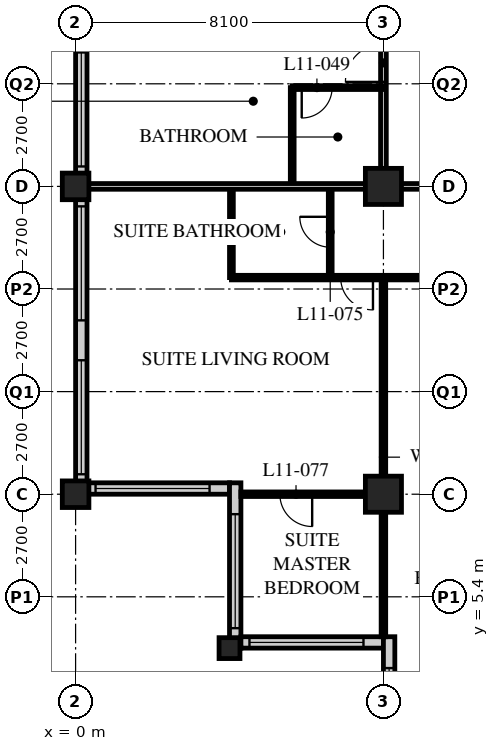
"""IFC4 building model, lengths in metres.
Left out: names, types, materials, properties, quantities, classifications, styles, units other than length and angle.
Written with IfcOpenShell. Run it as: python <this file> out.ifc"""

import sys

from ifc_helpers import new_model, si_unit, direction, frame, frame_2d, origin, origin_2d, place, context, subcontext, project, spatial, rectangle, hollow_rectangle, extrude, element, fill, save


model = new_model("IFC4")
c1 = context("Model", 3, precision=1e-05, world=origin(), true_north=direction((0.0, 1.0)))
c2 = subcontext(c1, "Body", "Model", "MODEL_VIEW")
j1 = project(units=[si_unit("LENGTHUNIT", "METRE"), si_unit("PLANEANGLEUNIT", "RADIAN")], contexts=[c1])
p1 = place(None, origin())
s1 = spatial("IfcSite", under=j1, at=p1, CompositionType="ELEMENT")
p2 = place(p1, origin())
s2 = spatial("IfcBuilding", under=s1, at=p2, CompositionType="ELEMENT")
p3 = place(p2, frame((0.0, 0.0, 50.0)))
s3 = spatial("IfcBuildingStorey", under=s2, at=p3, CompositionType="ELEMENT", Elevation=50.0)
for number, where, z_axis, x_axis in (
    (1, (0.0, 8.1, 0.0), (0.0, 0.0, 1.0), (1.0, 0.0, 0.0)),
    (2, (0.0, 16.2, 0.0), (0.0, 0.0, 1.0), (1.0, 0.0, 0.0)),
):
    element("IfcColumn", number, at=place(p3, frame(where, z_axis=z_axis, x_axis=x_axis)), inside=s3, PredefinedType="COLUMN", context=c2, shape_type="SweptSolid", body=[
        extrude(hollow_rectangle(XDim=0.7, YDim=0.7, WallThickness=0.06, at=origin_2d()), origin(), (0.0, 0.0, 1.0), 3.4),
    ])
p4 = place(p3, frame((4.05, 4.05, 0.0), z_axis=(0.0, 0.0, 1.0), x_axis=(1.0, 0.0, 0.0)))
e3 = element("IfcColumn", 3, at=p4, inside=s3, PredefinedType="COLUMN", context=c2, shape_type="SweptSolid", body=[
    extrude(hollow_rectangle(XDim=0.55, YDim=0.55, WallThickness=0.05, at=origin_2d()), origin(), (0.0, 0.0, 1.0), 3.4),
])
for number, where, z_axis, x_axis in (
    (4, (8.1, 8.1, 0.0), (0.0, 0.0, 1.0), (1.0, 0.0, 0.0)),
    (5, (8.1, 16.2, 0.0), (0.0, 0.0, 1.0), (1.0, 0.0, 0.0)),
):
    element("IfcColumn", number, at=place(p3, frame(where, z_axis=z_axis, x_axis=x_axis)), inside=s3, PredefinedType="COLUMN", context=c2, shape_type="SweptSolid", body=[
        extrude(hollow_rectangle(XDim=0.95, YDim=0.95, WallThickness=0.095, at=origin_2d()), origin(), (0.0, 0.0, 1.0), 3.4),
    ])
p5 = place(p3, frame((0.15, 40.2, 0.0), z_axis=(0.0, 0.0, 1.0), x_axis=(0.0, -1.0, 0.0)))
e6 = element("IfcWall", 6, at=p5, inside=s3, PredefinedType="SOLIDWALL", context=c2, shape_type="SweptSolid", body=[
    extrude(rectangle(XDim=32.1, YDim=0.3, at=frame_2d((16.05, 0.0))), origin(), (0.0, 0.0, 1.0), 3.19),
])
p6 = place(p5, frame((0.225, 0.0, 0.9)))
e7 = element("IfcOpeningElement", 7, at=p6, cuts=e6, PredefinedType="OPENING", context=c2, shape_type="SweptSolid", body=[
    extrude(rectangle(XDim=3.0, YDim=2.0, at=frame_2d((1.5, 1.0))), frame((0.0, 0.16, 0.0), z_axis=(0.0, -1.0, 0.0), x_axis=(1.0, 0.0, 0.0)), (0.0, 0.0, 1.0), 0.32),
])
p7 = place(p5, frame((4.275, 0.0, 0.9)))
e8 = element("IfcOpeningElement", 8, at=p7, cuts=e6, PredefinedType="OPENING", context=c2, shape_type="SweptSolid", body=[
    extrude(rectangle(XDim=3.0, YDim=2.0, at=frame_2d((1.5, 1.0))), frame((0.0, 0.16, 0.0), z_axis=(0.0, -1.0, 0.0), x_axis=(1.0, 0.0, 0.0)), (0.0, 0.0, 1.0), 0.32),
])
p8 = place(p5, frame((8.325, 0.0, 0.9)))
e9 = element("IfcOpeningElement", 9, at=p8, cuts=e6, PredefinedType="OPENING", context=c2, shape_type="SweptSolid", body=[
    extrude(rectangle(XDim=3.0, YDim=2.0, at=frame_2d((1.5, 1.0))), frame((0.0, 0.16, 0.0), z_axis=(0.0, -1.0, 0.0), x_axis=(1.0, 0.0, 0.0)), (0.0, 0.0, 1.0), 0.32),
])
p9 = place(p5, frame((12.375, 0.0, 0.9)))
e10 = element("IfcOpeningElement", 10, at=p9, cuts=e6, PredefinedType="OPENING", context=c2, shape_type="SweptSolid", body=[
    extrude(rectangle(XDim=3.0, YDim=2.0, at=frame_2d((1.5, 1.0))), frame((0.0, 0.16, 0.0), z_axis=(0.0, -1.0, 0.0), x_axis=(1.0, 0.0, 0.0)), (0.0, 0.0, 1.0), 0.32),
])
p10 = place(p5, frame((16.425, 0.0, 0.9)))
e11 = element("IfcOpeningElement", 11, at=p10, cuts=e6, PredefinedType="OPENING", context=c2, shape_type="SweptSolid", body=[
    extrude(rectangle(XDim=3.0, YDim=2.0, at=frame_2d((1.5, 1.0))), frame((0.0, 0.16, 0.0), z_axis=(0.0, -1.0, 0.0), x_axis=(1.0, 0.0, 0.0)), (0.0, 0.0, 1.0), 0.32),
])
p11 = place(p5, frame((20.475, 0.0, 0.9)))
e12 = element("IfcOpeningElement", 12, at=p11, cuts=e6, PredefinedType="OPENING", context=c2, shape_type="SweptSolid", body=[
    extrude(rectangle(XDim=3.0, YDim=2.0, at=frame_2d((1.5, 1.0))), frame((0.0, 0.16, 0.0), z_axis=(0.0, -1.0, 0.0), x_axis=(1.0, 0.0, 0.0)), (0.0, 0.0, 1.0), 0.32),
])
p12 = place(p5, frame((24.525, 0.0, 0.9)))
e13 = element("IfcOpeningElement", 13, at=p12, cuts=e6, PredefinedType="OPENING", context=c2, shape_type="SweptSolid", body=[
    extrude(rectangle(XDim=3.0, YDim=2.0, at=frame_2d((1.5, 1.0))), frame((0.0, 0.16, 0.0), z_axis=(0.0, -1.0, 0.0), x_axis=(1.0, 0.0, 0.0)), (0.0, 0.0, 1.0), 0.32),
])
p13 = place(p5, frame((28.575, 0.0, 0.9)))
e14 = element("IfcOpeningElement", 14, at=p13, cuts=e6, PredefinedType="OPENING", context=c2, shape_type="SweptSolid", body=[
    extrude(rectangle(XDim=3.0, YDim=2.0, at=frame_2d((1.5, 1.0))), frame((0.0, 0.16, 0.0), z_axis=(0.0, -1.0, 0.0), x_axis=(1.0, 0.0, 0.0)), (0.0, 0.0, 1.0), 0.32),
])
p14 = place(p3, frame((0.3, 8.25, 0.0), z_axis=(0.0, 0.0, 1.0), x_axis=(1.0, 0.0, 0.0)))
e15 = element("IfcWall", 15, at=p14, inside=s3, PredefinedType="SOLIDWALL", context=c2, shape_type="SweptSolid", body=[
    extrude(rectangle(XDim=3.75, YDim=0.3, at=frame_2d((1.875, 0.0))), origin(), (0.0, 0.0, 1.0), 3.19),
])
p15 = place(p14, frame((0.225, 0.0, 0.9)))
e16 = element("IfcOpeningElement", 16, at=p15, cuts=e15, PredefinedType="OPENING", context=c2, shape_type="SweptSolid", body=[
    extrude(rectangle(XDim=3.0, YDim=1.5, at=frame_2d((1.5, 0.75))), frame((0.0, 0.16, 0.0), z_axis=(0.0, -1.0, 0.0), x_axis=(1.0, 0.0, 0.0)), (0.0, 0.0, 1.0), 0.32),
])
p16 = place(p3, frame((4.2, 8.4, 0.0), z_axis=(0.0, 0.0, 1.0), x_axis=(0.0, -1.0, 0.0)))
e17 = element("IfcWall", 17, at=p16, inside=s3, PredefinedType="SOLIDWALL", context=c2, shape_type="SweptSolid", body=[
    extrude(rectangle(XDim=4.35, YDim=0.3, at=frame_2d((2.175, 0.0))), origin(), (0.0, 0.0, 1.0), 3.19),
])
p17 = place(p16, frame((0.825, 0.0, 0.9)))
e18 = element("IfcOpeningElement", 18, at=p17, cuts=e17, PredefinedType="OPENING", context=c2, shape_type="SweptSolid", body=[
    extrude(rectangle(XDim=3.0, YDim=1.5, at=frame_2d((1.5, 0.75))), frame((0.0, 0.16, 0.0), z_axis=(0.0, -1.0, 0.0), x_axis=(1.0, 0.0, 0.0)), (0.0, 0.0, 1.0), 0.32),
])
p18 = place(p3, frame((4.35, 4.2, 0.0), z_axis=(0.0, 0.0, 1.0), x_axis=(1.0, 0.0, 0.0)))
e19 = element("IfcWall", 19, at=p18, inside=s3, PredefinedType="SOLIDWALL", context=c2, shape_type="SweptSolid", body=[
    extrude(rectangle(XDim=3.75, YDim=0.3, at=frame_2d((1.875, 0.0))), origin(), (0.0, 0.0, 1.0), 3.19),
])
p19 = place(p18, frame((0.225, 0.0, 0.9)))
e20 = element("IfcOpeningElement", 20, at=p19, cuts=e19, PredefinedType="OPENING", context=c2, shape_type="SweptSolid", body=[
    extrude(rectangle(XDim=3.0, YDim=1.5, at=frame_2d((1.5, 0.75))), frame((0.0, 0.16, 0.0), z_axis=(0.0, -1.0, 0.0), x_axis=(1.0, 0.0, 0.0)), (0.0, 0.0, 1.0), 0.32),
])
p20 = place(p3, frame((8.25, 4.35, 0.0), z_axis=(0.0, 0.0, 1.0), x_axis=(0.0, -1.0, 0.0)))
e21 = element("IfcWall", 21, at=p20, inside=s3, PredefinedType="SOLIDWALL", context=c2, shape_type="SweptSolid", body=[
    extrude(rectangle(XDim=4.35, YDim=0.3, at=frame_2d((2.175, 0.0))), origin(), (0.0, 0.0, 1.0), 3.19),
])
p21 = place(p20, frame((0.825, 0.0, 0.9)))
e22 = element("IfcOpeningElement", 22, at=p21, cuts=e21, PredefinedType="OPENING", context=c2, shape_type="SweptSolid", body=[
    extrude(rectangle(XDim=3.0, YDim=1.5, at=frame_2d((1.5, 0.75))), frame((0.0, 0.16, 0.0), z_axis=(0.0, -1.0, 0.0), x_axis=(1.0, 0.0, 0.0)), (0.0, 0.0, 1.0), 0.32),
])
p22 = place(p3, frame((8.1, 16.2, 0.0), z_axis=(0.0, 0.0, 1.0), x_axis=(1.0, 0.0, 0.0)))
e23 = element("IfcWall", 23, at=p22, inside=s3, PredefinedType="PARTITIONING", context=c2, shape_type="SweptSolid", body=[
    extrude(rectangle(XDim=40.5, YDim=0.15, at=frame_2d((20.25, 0.0))), origin(), (0.0, 0.0, 1.0), 2.578),
])
p23 = place(p22, frame((4.35, 0.0, 0.0)))
e24 = element("IfcOpeningElement", 24, at=p23, cuts=e23, PredefinedType="OPENING", context=c2, shape_type="SweptSolid", body=[
    extrude(rectangle(XDim=1.0, YDim=2.1, at=frame_2d((0.5, 1.05))), frame((0.0, 0.085, 0.0), z_axis=(0.0, -1.0, 0.0), x_axis=(1.0, 0.0, 0.0)), (0.0, 0.0, 1.0), 0.17),
])
p24 = place(p22, frame((10.85, 0.0, 0.0)))
e25 = element("IfcOpeningElement", 25, at=p24, cuts=e23, PredefinedType="OPENING", context=c2, shape_type="SweptSolid", body=[
    extrude(rectangle(XDim=1.0, YDim=2.1, at=frame_2d((0.5, 1.05))), frame((0.0, 0.085, 0.0), z_axis=(0.0, -1.0, 0.0), x_axis=(1.0, 0.0, 0.0)), (0.0, 0.0, 1.0), 0.17),
])
p25 = place(p22, frame((12.75, 0.0, 0.0)))
e26 = element("IfcOpeningElement", 26, at=p25, cuts=e23, PredefinedType="OPENING", context=c2, shape_type="SweptSolid", body=[
    extrude(rectangle(XDim=1.0, YDim=2.1, at=frame_2d((0.5, 1.05))), frame((0.0, 0.085, 0.0), z_axis=(0.0, -1.0, 0.0), x_axis=(1.0, 0.0, 0.0)), (0.0, 0.0, 1.0), 0.17),
])
p26 = place(p22, frame((18.95, 0.0, 0.0)))
e27 = element("IfcOpeningElement", 27, at=p26, cuts=e23, PredefinedType="OPENING", context=c2, shape_type="SweptSolid", body=[
    extrude(rectangle(XDim=1.0, YDim=2.1, at=frame_2d((0.5, 1.05))), frame((0.0, 0.085, 0.0), z_axis=(0.0, -1.0, 0.0), x_axis=(1.0, 0.0, 0.0)), (0.0, 0.0, 1.0), 0.17),
])
p27 = place(p22, frame((20.55, 0.0, 0.0)))
e28 = element("IfcOpeningElement", 28, at=p27, cuts=e23, PredefinedType="OPENING", context=c2, shape_type="SweptSolid", body=[
    extrude(rectangle(XDim=1.0, YDim=2.1, at=frame_2d((0.5, 1.05))), frame((0.0, 0.085, 0.0), z_axis=(0.0, -1.0, 0.0), x_axis=(1.0, 0.0, 0.0)), (0.0, 0.0, 1.0), 0.17),
])
p28 = place(p22, frame((27.05, 0.0, 0.0)))
e29 = element("IfcOpeningElement", 29, at=p28, cuts=e23, PredefinedType="OPENING", context=c2, shape_type="SweptSolid", body=[
    extrude(rectangle(XDim=1.0, YDim=2.1, at=frame_2d((0.5, 1.05))), frame((0.0, 0.085, 0.0), z_axis=(0.0, -1.0, 0.0), x_axis=(1.0, 0.0, 0.0)), (0.0, 0.0, 1.0), 0.17),
])
p29 = place(p22, frame((28.95, 0.0, 0.0)))
e30 = element("IfcOpeningElement", 30, at=p29, cuts=e23, PredefinedType="OPENING", context=c2, shape_type="SweptSolid", body=[
    extrude(rectangle(XDim=1.0, YDim=2.1, at=frame_2d((0.5, 1.05))), frame((0.0, 0.085, 0.0), z_axis=(0.0, -1.0, 0.0), x_axis=(1.0, 0.0, 0.0)), (0.0, 0.0, 1.0), 0.17),
])
p30 = place(p22, frame((34.85, 0.0, 0.0)))
e31 = element("IfcOpeningElement", 31, at=p30, cuts=e23, PredefinedType="OPENING", context=c2, shape_type="SweptSolid", body=[
    extrude(rectangle(XDim=1.0, YDim=2.1, at=frame_2d((0.5, 1.05))), frame((0.0, 0.085, 0.0), z_axis=(0.0, -1.0, 0.0), x_axis=(1.0, 0.0, 0.0)), (0.0, 0.0, 1.0), 0.17),
])
p31 = place(p22, frame((1.525, 0.0, 0.0)))
e32 = element("IfcOpeningElement", 32, at=p31, cuts=e23, PredefinedType="OPENING", context=c2, shape_type="SweptSolid", body=[
    extrude(rectangle(XDim=1.0, YDim=2.1, at=frame_2d((0.5, 1.05))), frame((0.0, 0.085, 0.0), z_axis=(0.0, -1.0, 0.0), x_axis=(1.0, 0.0, 0.0)), (0.0, 0.0, 1.0), 0.17),
])
p32 = place(p22, frame((37.975, 0.0, 0.0)))
e33 = element("IfcOpeningElement", 33, at=p32, cuts=e23, PredefinedType="OPENING", context=c2, shape_type="SweptSolid", body=[
    extrude(rectangle(XDim=1.0, YDim=2.1, at=frame_2d((0.5, 1.05))), frame((0.0, 0.085, 0.0), z_axis=(0.0, -1.0, 0.0), x_axis=(1.0, 0.0, 0.0)), (0.0, 0.0, 1.0), 0.17),
])
p33 = place(p3, frame((8.1, 16.2, 0.0), z_axis=(0.0, 0.0, 1.0), x_axis=(0.0, 1.0, 0.0)))
e34 = element("IfcWall", 34, at=p33, inside=s3, PredefinedType="PARTITIONING", context=c2, shape_type="SweptSolid", body=[
    extrude(rectangle(XDim=26.1, YDim=0.15, at=frame_2d((13.05, 0.0))), origin(), (0.0, 0.0, 1.0), 2.578),
])
p34 = place(p33, frame((2.75, 0.0, 0.0)))
e35 = element("IfcOpeningElement", 35, at=p34, cuts=e34, PredefinedType="OPENING", context=c2, shape_type="SweptSolid", body=[
    extrude(rectangle(XDim=1.0, YDim=2.1, at=frame_2d((0.5, 1.05))), frame((0.0, 0.085, 0.0), z_axis=(0.0, -1.0, 0.0), x_axis=(1.0, 0.0, 0.0)), (0.0, 0.0, 1.0), 0.17),
])
p35 = place(p33, frame((4.35, 0.0, 0.0)))
e36 = element("IfcOpeningElement", 36, at=p35, cuts=e34, PredefinedType="OPENING", context=c2, shape_type="SweptSolid", body=[
    extrude(rectangle(XDim=1.0, YDim=2.1, at=frame_2d((0.5, 1.05))), frame((0.0, 0.085, 0.0), z_axis=(0.0, -1.0, 0.0), x_axis=(1.0, 0.0, 0.0)), (0.0, 0.0, 1.0), 0.17),
])
p36 = place(p33, frame((10.85, 0.0, 0.0)))
e37 = element("IfcOpeningElement", 37, at=p36, cuts=e34, PredefinedType="OPENING", context=c2, shape_type="SweptSolid", body=[
    extrude(rectangle(XDim=1.0, YDim=2.1, at=frame_2d((0.5, 1.05))), frame((0.0, 0.085, 0.0), z_axis=(0.0, -1.0, 0.0), x_axis=(1.0, 0.0, 0.0)), (0.0, 0.0, 1.0), 0.17),
])
p37 = place(p33, frame((12.45, 0.0, 0.0)))
e38 = element("IfcOpeningElement", 38, at=p37, cuts=e34, PredefinedType="OPENING", context=c2, shape_type="SweptSolid", body=[
    extrude(rectangle(XDim=1.0, YDim=2.1, at=frame_2d((0.5, 1.05))), frame((0.0, 0.085, 0.0), z_axis=(0.0, -1.0, 0.0), x_axis=(1.0, 0.0, 0.0)), (0.0, 0.0, 1.0), 0.17),
])
p38 = place(p33, frame((18.65, 0.0, 0.0)))
e39 = element("IfcOpeningElement", 39, at=p38, cuts=e34, PredefinedType="OPENING", context=c2, shape_type="SweptSolid", body=[
    extrude(rectangle(XDim=1.0, YDim=2.1, at=frame_2d((0.5, 1.05))), frame((0.0, 0.085, 0.0), z_axis=(0.0, -1.0, 0.0), x_axis=(1.0, 0.0, 0.0)), (0.0, 0.0, 1.0), 0.17),
])
p39 = place(p33, frame((22.7, 0.0, 0.0)))
e40 = element("IfcOpeningElement", 40, at=p39, cuts=e34, PredefinedType="OPENING", context=c2, shape_type="SweptSolid", body=[
    extrude(rectangle(XDim=1.0, YDim=2.1, at=frame_2d((0.5, 1.05))), frame((0.0, 0.085, 0.0), z_axis=(0.0, -1.0, 0.0), x_axis=(1.0, 0.0, 0.0)), (0.0, 0.0, 1.0), 0.17),
])
p40 = place(p3, frame((5.7, 16.2, 0.0), z_axis=(0.0, 0.0, 1.0), x_axis=(0.0, 1.0, 0.0)))
e41 = element("IfcWall", 41, at=p40, inside=s3, PredefinedType="PARTITIONING", context=c2, shape_type="SweptSolid", body=[
    extrude(rectangle(XDim=2.6, YDim=0.1, at=frame_2d((1.3, 0.0))), origin(), (0.0, 0.0, 1.0), 3.19),
])
p41 = place(p3, frame((8.1, 18.8, 0.0), z_axis=(0.0, 0.0, 1.0), x_axis=(-1.0, 0.0, 0.0)))
e42 = element("IfcWall", 42, at=p41, inside=s3, PredefinedType="PARTITIONING", context=c2, shape_type="SweptSolid", body=[
    extrude(rectangle(XDim=2.4, YDim=0.1, at=frame_2d((1.2, 0.0))), origin(), (0.0, 0.0, 1.0), 3.19),
])
p42 = place(p41, frame((1.35, 0.0, 0.0)))
e43 = element("IfcOpeningElement", 43, at=p42, cuts=e42, PredefinedType="OPENING", context=c2, shape_type="SweptSolid", body=[
    extrude(rectangle(XDim=0.8, YDim=2.1, at=frame_2d((0.4, 1.05))), frame((0.0, 0.06, 0.0), z_axis=(0.0, -1.0, 0.0), x_axis=(1.0, 0.0, 0.0)), (0.0, 0.0, 1.0), 0.12),
])
p43 = place(p3, frame((6.7, 16.2, 0.0), z_axis=(0.0, 0.0, 1.0), x_axis=(0.0, -1.0, 0.0)))
e44 = element("IfcWall", 44, at=p43, inside=s3, PredefinedType="PARTITIONING", context=c2, shape_type="SweptSolid", body=[
    extrude(rectangle(XDim=2.4, YDim=0.1, at=frame_2d((1.2, 0.0))), origin(), (0.0, 0.0, 1.0), 3.19),
])
p44 = place(p43, frame((0.8, 0.0, 0.0)))
e45 = element("IfcOpeningElement", 45, at=p44, cuts=e44, PredefinedType="OPENING", context=c2, shape_type="SweptSolid", body=[
    extrude(rectangle(XDim=0.8, YDim=2.1, at=frame_2d((0.4, 1.05))), frame((0.0, 0.06, 0.0), z_axis=(0.0, -1.0, 0.0), x_axis=(1.0, 0.0, 0.0)), (0.0, 0.0, 1.0), 0.12),
])
p45 = place(p3, frame((4.1, 16.2, 0.0), z_axis=(0.0, 0.0, 1.0), x_axis=(0.0, -1.0, 0.0)))
e46 = element("IfcWall", 46, at=p45, inside=s3, PredefinedType="PARTITIONING", context=c2, shape_type="SweptSolid", body=[
    extrude(rectangle(XDim=2.4, YDim=0.1, at=frame_2d((1.2, 0.0))), origin(), (0.0, 0.0, 1.0), 3.19),
])
p46 = place(p3, frame((4.1, 13.8, 0.0), z_axis=(0.0, 0.0, 1.0), x_axis=(1.0, 0.0, 0.0)))
e47 = element("IfcWall", 47, at=p46, inside=s3, PredefinedType="PARTITIONING", context=c2, shape_type="SweptSolid", body=[
    extrude(rectangle(XDim=8.05, YDim=0.12, at=frame_2d((4.025, 0.0))), origin(), (0.0, 0.0, 1.0), 3.19),
])
p47 = place(p46, frame((6.725, 0.0, 0.0)))
e48 = element("IfcOpeningElement", 48, at=p47, cuts=e47, PredefinedType="OPENING", context=c2, shape_type="SweptSolid", body=[
    extrude(rectangle(XDim=0.85, YDim=2.1, at=frame_2d((0.425, 1.05))), frame((0.0, 0.07, 0.0), z_axis=(0.0, -1.0, 0.0), x_axis=(1.0, 0.0, 0.0)), (0.0, 0.0, 1.0), 0.14),
])
p48 = place(p46, frame((2.875, 0.0, 0.0)))
e49 = element("IfcOpeningElement", 49, at=p48, cuts=e47, PredefinedType="OPENING", context=c2, shape_type="SweptSolid", body=[
    extrude(rectangle(XDim=0.85, YDim=2.1, at=frame_2d((0.425, 1.05))), frame((0.0, 0.07, 0.0), z_axis=(0.0, -1.0, 0.0), x_axis=(1.0, 0.0, 0.0)), (0.0, 0.0, 1.0), 0.14),
])
p49 = place(p3, frame((8.1, 13.8, 0.0), z_axis=(0.0, 0.0, 1.0), x_axis=(0.0, -1.0, 0.0)))
e50 = element("IfcWall", 50, at=p49, inside=s3, PredefinedType="PARTITIONING", context=c2, shape_type="SweptSolid", body=[
    extrude(rectangle(XDim=9.45, YDim=0.12, at=frame_2d((4.725, 0.0))), origin(), (0.0, 0.0, 1.0), 2.578),
])
p50 = place(p3, frame((8.1, 8.1, 0.0), z_axis=(0.0, 0.0, 1.0), x_axis=(-1.0, 0.0, 0.0)))
e51 = element("IfcWall", 51, at=p50, inside=s3, PredefinedType="PARTITIONING", context=c2, shape_type="SweptSolid", body=[
    extrude(rectangle(XDim=3.75, YDim=0.12, at=frame_2d((1.875, 0.0))), origin(), (0.0, 0.0, 1.0), 2.578),
])
p51 = place(p50, frame((1.875, 0.0, 0.0)))
e52 = element("IfcOpeningElement", 52, at=p51, cuts=e51, PredefinedType="OPENING", context=c2, shape_type="SweptSolid", body=[
    extrude(rectangle(XDim=0.85, YDim=2.1, at=frame_2d((0.425, 1.05))), frame((0.0, 0.07, 0.0), z_axis=(0.0, -1.0, 0.0), x_axis=(1.0, 0.0, 0.0)), (0.0, 0.0, 1.0), 0.14),
])
p52 = place(p3, frame((0.3, 16.2, 0.0), z_axis=(0.0, 0.0, 1.0), x_axis=(1.0, 0.0, 0.0)))
e53 = element("IfcWall", 53, at=p52, inside=s3, PredefinedType="PARTITIONING", context=c2, shape_type="SweptSolid", body=[
    extrude(rectangle(XDim=7.8, YDim=0.15, at=frame_2d((3.9, 0.0))), origin(), (0.0, 0.0, 1.0), 2.578),
])
p53 = place(p11, origin())
e54 = element("IfcWindow", 54, at=p53, inside=s3, PartitioningType="SINGLE_PANEL", PredefinedType="WINDOW", context=c2, shape_type="SweptSolid", body=[
    extrude(rectangle(XDim=3.0, YDim=2.0, at=frame_2d((1.5, 1.0))), frame((0.0, 0.03, 0.0), z_axis=(0.0, -1.0, 0.0), x_axis=(1.0, 0.0, 0.0)), (0.0, 0.0, 1.0), 0.06),
])
fill(e12, e54)
p54 = place(p12, origin())
e55 = element("IfcWindow", 55, at=p54, inside=s3, PartitioningType="SINGLE_PANEL", PredefinedType="WINDOW", context=c2, shape_type="SweptSolid", body=[
    extrude(rectangle(XDim=3.0, YDim=2.0, at=frame_2d((1.5, 1.0))), frame((0.0, 0.03, 0.0), z_axis=(0.0, -1.0, 0.0), x_axis=(1.0, 0.0, 0.0)), (0.0, 0.0, 1.0), 0.06),
])
fill(e13, e55)
p55 = place(p13, origin())
e56 = element("IfcWindow", 56, at=p55, inside=s3, PartitioningType="SINGLE_PANEL", PredefinedType="WINDOW", context=c2, shape_type="SweptSolid", body=[
    extrude(rectangle(XDim=3.0, YDim=2.0, at=frame_2d((1.5, 1.0))), frame((0.0, 0.03, 0.0), z_axis=(0.0, -1.0, 0.0), x_axis=(1.0, 0.0, 0.0)), (0.0, 0.0, 1.0), 0.06),
])
fill(e14, e56)
p56 = place(p15, origin())
e57 = element("IfcWindow", 57, at=p56, inside=s3, PartitioningType="SINGLE_PANEL", PredefinedType="WINDOW", context=c2, shape_type="SweptSolid", body=[
    extrude(rectangle(XDim=3.0, YDim=1.5, at=frame_2d((1.5, 0.75))), frame((0.0, 0.03, 0.0), z_axis=(0.0, -1.0, 0.0), x_axis=(1.0, 0.0, 0.0)), (0.0, 0.0, 1.0), 0.06),
])
fill(e16, e57)
p57 = place(p17, origin())
e58 = element("IfcWindow", 58, at=p57, inside=s3, PartitioningType="SINGLE_PANEL", PredefinedType="WINDOW", context=c2, shape_type="SweptSolid", body=[
    extrude(rectangle(XDim=3.0, YDim=1.5, at=frame_2d((1.5, 0.75))), frame((0.0, 0.03, 0.0), z_axis=(0.0, -1.0, 0.0), x_axis=(1.0, 0.0, 0.0)), (0.0, 0.0, 1.0), 0.06),
])
fill(e18, e58)
p58 = place(p19, origin())
e59 = element("IfcWindow", 59, at=p58, inside=s3, PartitioningType="SINGLE_PANEL", PredefinedType="WINDOW", context=c2, shape_type="SweptSolid", body=[
    extrude(rectangle(XDim=3.0, YDim=1.5, at=frame_2d((1.5, 0.75))), frame((0.0, 0.03, 0.0), z_axis=(0.0, -1.0, 0.0), x_axis=(1.0, 0.0, 0.0)), (0.0, 0.0, 1.0), 0.06),
])
fill(e20, e59)
p59 = place(p21, origin())
e60 = element("IfcWindow", 60, at=p59, inside=s3, PartitioningType="SINGLE_PANEL", PredefinedType="WINDOW", context=c2, shape_type="SweptSolid", body=[
    extrude(rectangle(XDim=3.0, YDim=1.5, at=frame_2d((1.5, 0.75))), frame((0.0, 0.03, 0.0), z_axis=(0.0, -1.0, 0.0), x_axis=(1.0, 0.0, 0.0)), (0.0, 0.0, 1.0), 0.06),
])
fill(e22, e60)
p60 = place(p42, origin())
e61 = element("IfcDoor", 61, at=p60, inside=s3, OperationType="SINGLE_SWING_RIGHT", PredefinedType="DOOR", context=c2, shape_type="SweptSolid", body=[
    extrude(rectangle(XDim=0.8, YDim=2.1, at=frame_2d((0.4, 1.05))), frame((0.0, 0.025, 0.0), z_axis=(0.0, -1.0, 0.0), x_axis=(1.0, 0.0, 0.0)), (0.0, 0.0, 1.0), 0.05),
])
fill(e43, e61)
p61 = place(p34, origin())
e62 = element("IfcDoor", 62, at=p61, inside=s3, OperationType="SINGLE_SWING_LEFT", PredefinedType="DOOR", context=c2, shape_type="SweptSolid", body=[
    extrude(rectangle(XDim=1.0, YDim=2.1, at=frame_2d((0.5, 1.05))), frame((0.0, 0.025, 0.0), z_axis=(0.0, -1.0, 0.0), x_axis=(1.0, 0.0, 0.0)), (0.0, 0.0, 1.0), 0.05),
])
fill(e35, e62)
p62 = place(p44, origin())
e63 = element("IfcDoor", 63, at=p62, inside=s3, OperationType="SINGLE_SWING_RIGHT", PredefinedType="DOOR", context=c2, shape_type="SweptSolid", body=[
    extrude(rectangle(XDim=0.8, YDim=2.1, at=frame_2d((0.4, 1.05))), frame((0.0, 0.025, 0.0), z_axis=(0.0, -1.0, 0.0), x_axis=(1.0, 0.0, 0.0)), (0.0, 0.0, 1.0), 0.05),
])
fill(e45, e63)
p63 = place(p48, origin())
e64 = element("IfcDoor", 64, at=p63, inside=s3, OperationType="SINGLE_SWING_LEFT", PredefinedType="DOOR", context=c2, shape_type="SweptSolid", body=[
    extrude(rectangle(XDim=0.85, YDim=2.1, at=frame_2d((0.425, 1.05))), frame((0.0, 0.025, 0.0), z_axis=(0.0, -1.0, 0.0), x_axis=(1.0, 0.0, 0.0)), (0.0, 0.0, 1.0), 0.05),
])
fill(e49, e64)
p64 = place(p51, origin())
e65 = element("IfcDoor", 65, at=p64, inside=s3, OperationType="SINGLE_SWING_LEFT", PredefinedType="DOOR", context=c2, shape_type="SweptSolid", body=[
    extrude(rectangle(XDim=0.85, YDim=2.1, at=frame_2d((0.425, 1.05))), frame((0.0, 0.025, 0.0), z_axis=(0.0, -1.0, 0.0), x_axis=(1.0, 0.0, 0.0)), (0.0, 0.0, 1.0), 0.05),
])
fill(e52, e65)
save(model, sys.argv[1])
